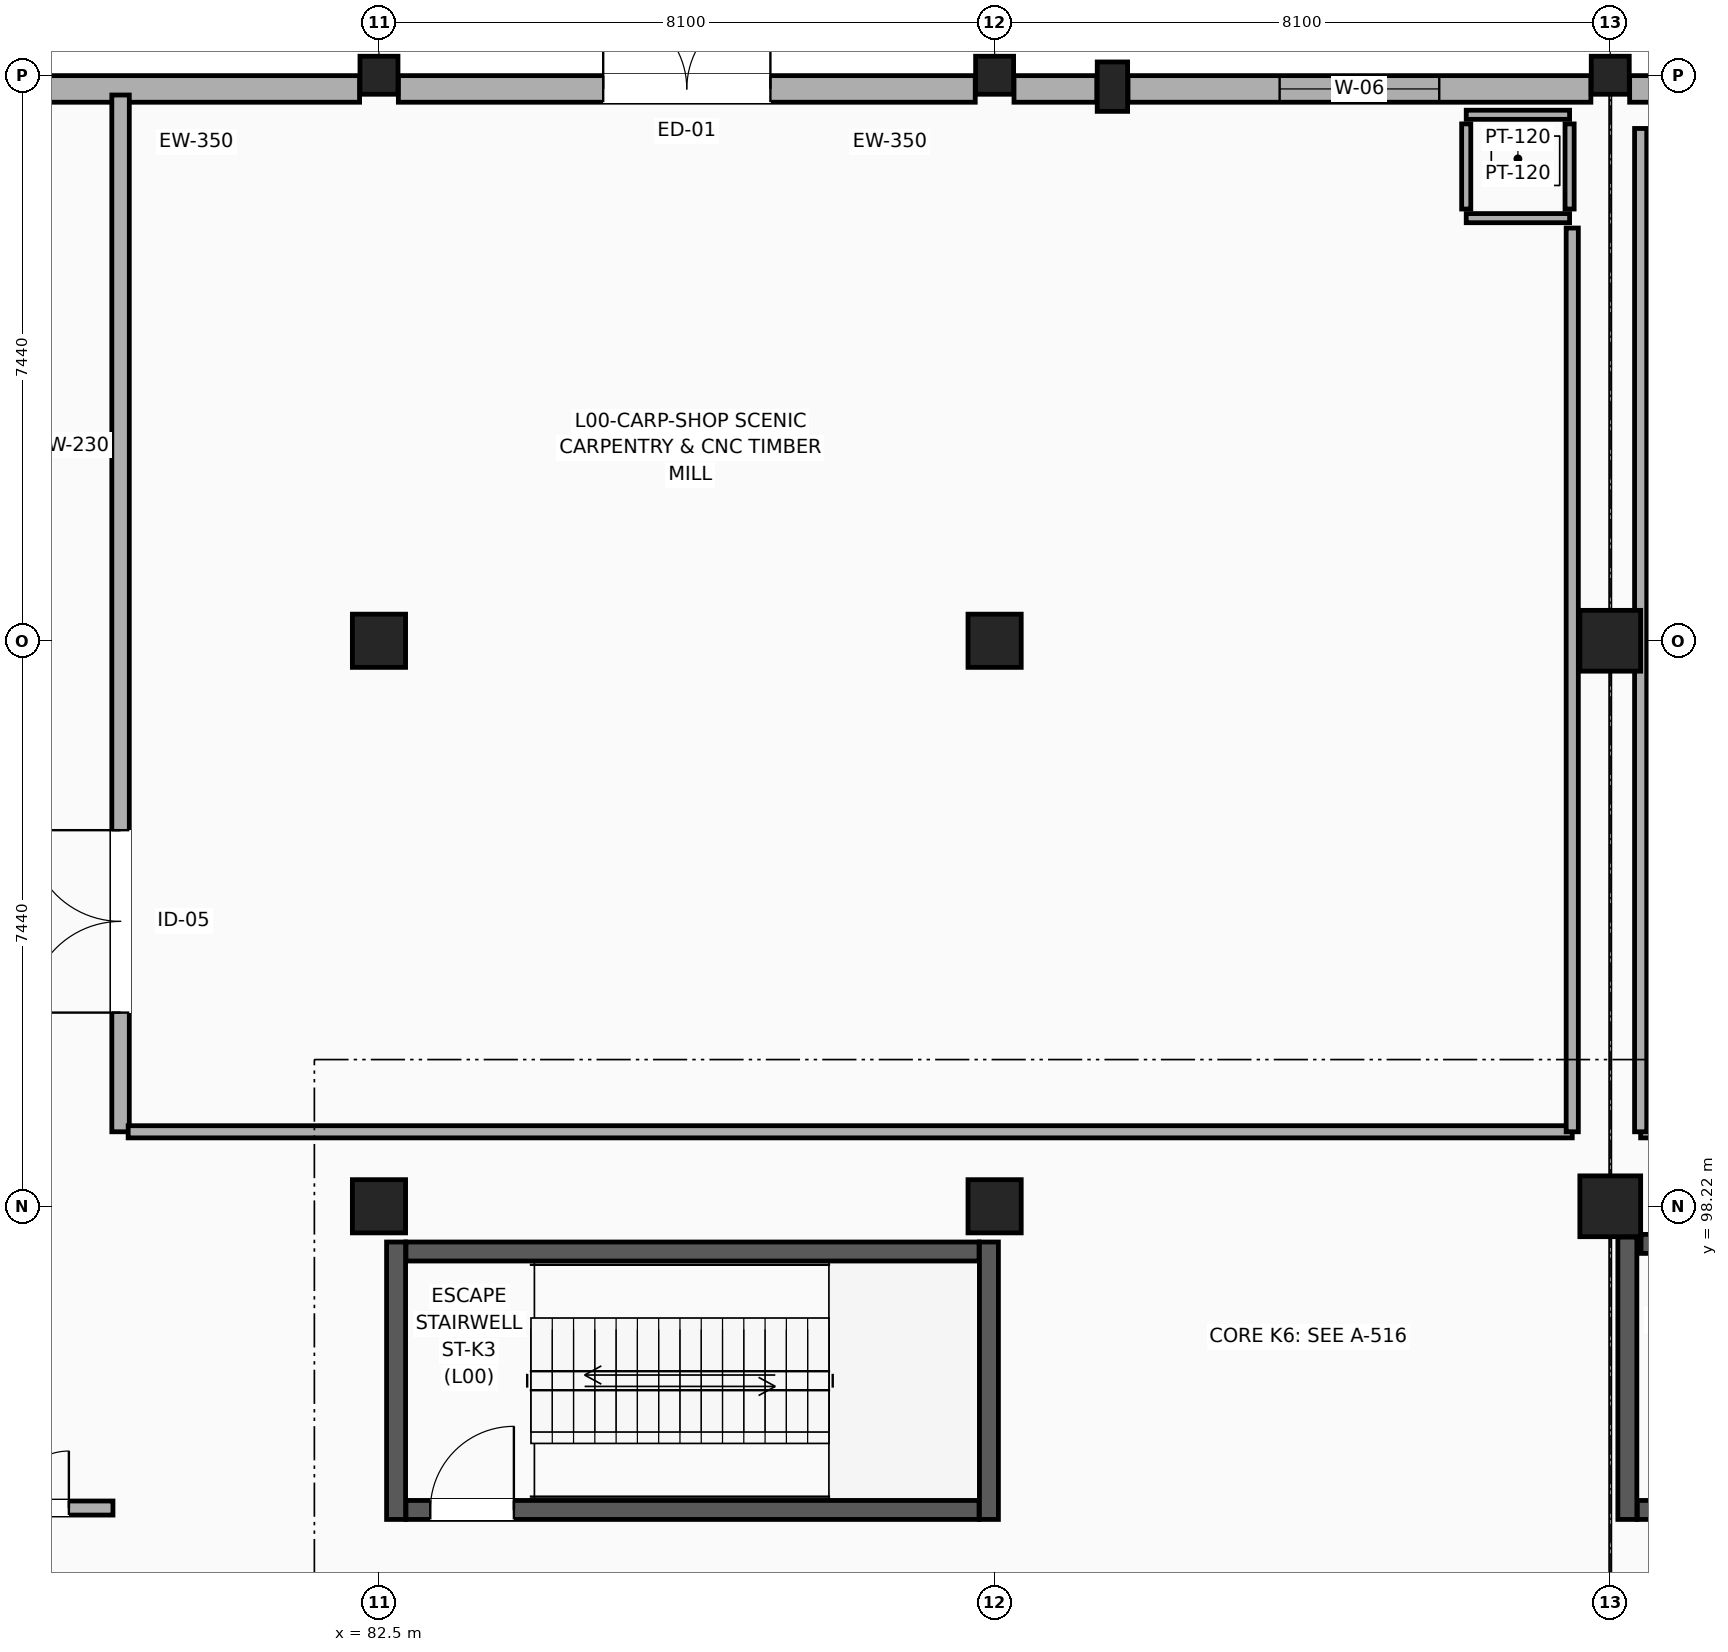
"""IFC4 building model, lengths in metres.
Left out: names, types, materials, properties, quantities, classifications, styles, units other than length and angle.
Written with IfcOpenShell. Run it as: python <this file> out.ifc"""

import sys

from ifc_helpers import new_model, si_unit, direction, frame, frame_2d, origin, origin_2d, place, context, subcontext, project, spatial, rectangle, extrude, element, fill, save


model = new_model("IFC4")
c1 = context("Model", 3, precision=1e-05, world=origin(), true_north=direction((0.0, 1.0)))
c2 = subcontext(c1, "Body", "Model", "MODEL_VIEW")
j1 = project(units=[si_unit("LENGTHUNIT", "METRE"), si_unit("PLANEANGLEUNIT", "RADIAN")], contexts=[c1])
p1 = place(None, origin())
s1 = spatial("IfcSite", under=j1, at=p1, CompositionType="ELEMENT")
p2 = place(p1, origin())
s2 = spatial("IfcBuilding", under=s1, at=p2, CompositionType="ELEMENT")
p3 = place(p2, origin())
s3 = spatial("IfcBuildingStorey", under=s2, at=p3, CompositionType="ELEMENT", Elevation=0.0)
p4 = place(p3, frame((92.15, 112.95, 0.0), z_axis=(0.0, 0.0, 1.0), x_axis=(1.0, 0.0, 0.0)))
e1 = element("IfcColumn", 1, at=p4, inside=s3, PredefinedType="PILASTER", context=c2, shape_type="SweptSolid", body=[
    extrude(rectangle(XDim=0.4, YDim=0.65, at=origin_2d()), origin(), (0.0, 0.0, 1.0), 5.4),
])
for number, where, z_axis, x_axis in (
    (2, (82.5, 98.22, 0.0), (0.0, 0.0, 1.0), (1.0, 0.0, 0.0)),
    (3, (82.5, 105.66, 0.0), (0.0, 0.0, 1.0), (1.0, 0.0, 0.0)),
):
    element("IfcColumn", number, at=place(p3, frame(where, z_axis=z_axis, x_axis=x_axis)), inside=s3, PredefinedType="COLUMN", context=c2, shape_type="SweptSolid", body=[
        extrude(rectangle(XDim=0.7, YDim=0.7, at=origin_2d()), origin(), (0.0, 0.0, 1.0), 5.4),
    ])
p5 = place(p3, frame((82.5, 113.1, 0.0), z_axis=(0.0, 0.0, 1.0), x_axis=(1.0, 0.0, 0.0)))
e4 = element("IfcColumn", 4, at=p5, inside=s3, PredefinedType="COLUMN", context=c2, shape_type="SweptSolid", body=[
    extrude(rectangle(XDim=0.5, YDim=0.5, at=origin_2d()), origin(), (0.0, 0.0, 1.0), 5.4),
])
for number, where, z_axis, x_axis in (
    (5, (90.6, 98.22, 0.0), (0.0, 0.0, 1.0), (1.0, 0.0, 0.0)),
    (6, (90.6, 105.66, 0.0), (0.0, 0.0, 1.0), (1.0, 0.0, 0.0)),
):
    element("IfcColumn", number, at=place(p3, frame(where, z_axis=z_axis, x_axis=x_axis)), inside=s3, PredefinedType="COLUMN", context=c2, shape_type="SweptSolid", body=[
        extrude(rectangle(XDim=0.7, YDim=0.7, at=origin_2d()), origin(), (0.0, 0.0, 1.0), 5.4),
    ])
p6 = place(p3, frame((90.6, 113.1, 0.0), z_axis=(0.0, 0.0, 1.0), x_axis=(1.0, 0.0, 0.0)))
e7 = element("IfcColumn", 7, at=p6, inside=s3, PredefinedType="COLUMN", context=c2, shape_type="SweptSolid", body=[
    extrude(rectangle(XDim=0.5, YDim=0.5, at=origin_2d()), origin(), (0.0, 0.0, 1.0), 5.4),
])
for number, where, z_axis, x_axis in (
    (8, (98.7, 98.22, 0.0), (0.0, 0.0, 1.0), (1.0, 0.0, 0.0)),
    (9, (98.7, 105.66, 0.0), (0.0, 0.0, 1.0), (1.0, 0.0, 0.0)),
):
    element("IfcColumn", number, at=place(p3, frame(where, z_axis=z_axis, x_axis=x_axis)), inside=s3, PredefinedType="COLUMN", context=c2, shape_type="SweptSolid", body=[
        extrude(rectangle(XDim=0.8, YDim=0.8, at=origin_2d()), origin(), (0.0, 0.0, 1.0), 5.4),
    ])
p7 = place(p3, frame((98.7, 113.1, 0.0), z_axis=(0.0, 0.0, 1.0), x_axis=(1.0, 0.0, 0.0)))
e10 = element("IfcColumn", 10, at=p7, inside=s3, PredefinedType="COLUMN", context=c2, shape_type="SweptSolid", body=[
    extrude(rectangle(XDim=0.5, YDim=0.5, at=origin_2d()), origin(), (0.0, 0.0, 1.0), 5.4),
])
p8 = place(p3, frame((74.655, 112.92, 0.0), z_axis=(0.0, 0.0, 1.0), x_axis=(1.0, 0.0, 0.0)))
e11 = element("IfcWall", 11, at=p8, inside=s3, PredefinedType="SOLIDWALL", context=c2, shape_type="SweptSolid", body=[
    extrude(rectangle(XDim=7.59, YDim=0.35, at=frame_2d((3.795, 0.0))), origin(), (0.0, 0.0, 1.0), 4.037),
])
p9 = place(p8, frame((1.645, 0.0, 0.0)))
e12 = element("IfcOpeningElement", 12, at=p9, cuts=e11, PredefinedType="OPENING", context=c2, shape_type="SweptSolid", body=[
    extrude(rectangle(XDim=1.2, YDim=2.2, at=frame_2d((0.6, 1.1))), frame((0.0, 0.185, 0.0), z_axis=(0.0, -1.0, 0.0), x_axis=(1.0, 0.0, 0.0)), (0.0, 0.0, 1.0), 0.37),
])
p10 = place(p3, frame((82.755, 112.92, 0.0), z_axis=(0.0, 0.0, 1.0), x_axis=(1.0, 0.0, 0.0)))
e13 = element("IfcWall", 13, at=p10, inside=s3, PredefinedType="SOLIDWALL", context=c2, shape_type="SweptSolid", body=[
    extrude(rectangle(XDim=7.59, YDim=0.35, at=frame_2d((3.795, 0.0))), origin(), (0.0, 0.0, 1.0), 4.037),
])
p11 = place(p10, frame((2.695, 0.0, 0.0)))
e14 = element("IfcOpeningElement", 14, at=p11, cuts=e13, PredefinedType="OPENING", context=c2, shape_type="SweptSolid", body=[
    extrude(rectangle(XDim=2.2, YDim=2.6, at=frame_2d((1.1, 1.3))), frame((0.0, 0.185, 0.0), z_axis=(0.0, -1.0, 0.0), x_axis=(1.0, 0.0, 0.0)), (0.0, 0.0, 1.0), 0.37),
])
p12 = place(p3, frame((92.355, 112.92, 0.0), z_axis=(0.0, 0.0, 1.0), x_axis=(1.0, 0.0, 0.0)))
e15 = element("IfcWall", 15, at=p12, inside=s3, PredefinedType="SOLIDWALL", context=c2, shape_type="SweptSolid", body=[
    extrude(rectangle(XDim=6.09, YDim=0.35, at=frame_2d((3.045, 0.0))), origin(), (0.0, 0.0, 1.0), 4.137),
])
p13 = place(p12, frame((1.995, 0.0, 0.9)))
e16 = element("IfcOpeningElement", 16, at=p13, cuts=e15, PredefinedType="OPENING", context=c2, shape_type="SweptSolid", body=[
    extrude(rectangle(XDim=2.1, YDim=1.5, at=frame_2d((1.05, 0.75))), frame((0.0, 0.185, 0.0), z_axis=(0.0, -1.0, 0.0), x_axis=(1.0, 0.0, 0.0)), (0.0, 0.0, 1.0), 0.37),
])
p14 = place(p3, frame((90.855, 112.92, 0.0), z_axis=(0.0, 0.0, 1.0), x_axis=(1.0, 0.0, 0.0)))
e17 = element("IfcWall", 17, at=p14, inside=s3, PredefinedType="SOLIDWALL", context=c2, shape_type="SweptSolid", body=[
    extrude(rectangle(XDim=1.09, YDim=0.35, at=frame_2d((0.545, 0.0))), origin(), (0.0, 0.0, 1.0), 4.137),
])
p15 = place(p3, frame((98.955, 112.92, 0.0), z_axis=(0.0, 0.0, 1.0), x_axis=(1.0, 0.0, 0.0)))
e18 = element("IfcWall", 18, at=p15, inside=s3, PredefinedType="SOLIDWALL", context=c2, shape_type="SweptSolid", body=[
    extrude(rectangle(XDim=1.065, YDim=0.35, at=frame_2d((0.532, 0.0))), origin(), (0.0, 0.0, 1.0), 4.137),
])
p16 = place(p3, frame((82.855, 94.225, 0.0), z_axis=(0.0, 0.0, 1.0), x_axis=(1.0, 0.0, 0.0)))
e19 = element("IfcWall", 19, at=p16, inside=s3, PredefinedType="SHEAR", context=c2, shape_type="SweptSolid", body=[
    extrude(rectangle(XDim=7.54, YDim=0.25, at=frame_2d((3.77, 0.0))), origin(), (0.0, 0.0, 1.0), 5.105),
])
p17 = place(p16, frame((0.32, 0.0, 0.0)))
e20 = element("IfcOpeningElement", 20, at=p17, cuts=e19, PredefinedType="OPENING", context=c2, shape_type="SweptSolid", body=[
    extrude(rectangle(XDim=1.1, YDim=2.2, at=frame_2d((0.55, 1.1))), frame((0.0, 0.135, 0.0), z_axis=(0.0, -1.0, 0.0), x_axis=(1.0, 0.0, 0.0)), (0.0, 0.0, 1.0), 0.27),
])
p18 = place(p3, frame((82.855, 97.625, 0.0), z_axis=(0.0, 0.0, 1.0), x_axis=(1.0, 0.0, 0.0)))
e21 = element("IfcWall", 21, at=p18, inside=s3, PredefinedType="SHEAR", context=c2, shape_type="SweptSolid", body=[
    extrude(rectangle(XDim=7.54, YDim=0.25, at=frame_2d((3.77, 0.0))), origin(), (0.0, 0.0, 1.0), 5.105),
])
for number, where, z_axis, x_axis in (
    (22, (82.725, 94.1, 0.0), (0.0, 0.0, 1.0), (0.0, 1.0, 0.0)),
    (23, (90.525, 94.1, 0.0), (0.0, 0.0, 1.0), (0.0, 1.0, 0.0)),
):
    element("IfcWall", number, at=place(p3, frame(where, z_axis=z_axis, x_axis=x_axis)), inside=s3, PredefinedType="SHEAR", context=c2, shape_type="SweptSolid", body=[
        extrude(rectangle(XDim=3.65, YDim=0.25, at=frame_2d((1.825, 0.0))), origin(), (0.0, 0.0, 1.0), 5.105),
    ])
p19 = place(p3, frame((99.055, 94.225, 0.0), z_axis=(0.0, 0.0, 1.0), x_axis=(1.0, 0.0, 0.0)))
e24 = element("IfcWall", 24, at=p19, inside=s3, PredefinedType="SHEAR", context=c2, shape_type="SweptSolid", body=[
    extrude(rectangle(XDim=7.54, YDim=0.25, at=frame_2d((3.77, 0.0))), origin(), (0.0, 0.0, 1.0), 5.105),
])
p20 = place(p19, frame((0.32, 0.0, 0.0)))
e25 = element("IfcOpeningElement", 25, at=p20, cuts=e24, PredefinedType="OPENING", context=c2, shape_type="SweptSolid", body=[
    extrude(rectangle(XDim=1.1, YDim=2.2, at=frame_2d((0.55, 1.1))), frame((0.0, 0.135, 0.0), z_axis=(0.0, -1.0, 0.0), x_axis=(1.0, 0.0, 0.0)), (0.0, 0.0, 1.0), 0.27),
])
p21 = place(p3, frame((99.105, 97.725, 0.0), z_axis=(0.0, 0.0, 1.0), x_axis=(1.0, 0.0, 0.0)))
e26 = element("IfcWall", 26, at=p21, inside=s3, PredefinedType="SHEAR", context=c2, shape_type="SweptSolid", body=[
    extrude(rectangle(XDim=7.49, YDim=0.25, at=frame_2d((3.745, 0.0))), origin(), (0.0, 0.0, 1.0), 5.105),
])
p22 = place(p3, frame((98.925, 94.1, 0.0), z_axis=(0.0, 0.0, 1.0), x_axis=(0.0, 1.0, 0.0)))
e27 = element("IfcWall", 27, at=p22, inside=s3, PredefinedType="SHEAR", context=c2, shape_type="SweptSolid", body=[
    extrude(rectangle(XDim=3.715, YDim=0.25, at=frame_2d((1.857, 0.0))), origin(), (0.0, 0.0, 1.0), 5.105),
])
for number, where, z_axis, x_axis in (
    (28, (96.805, 111.22, 0.0), (0.0, 0.0, 1.0), (1.0, 0.0, 0.0)),
    (29, (96.805, 112.58, 0.0), (0.0, 0.0, 1.0), (1.0, 0.0, 0.0)),
):
    element("IfcWall", number, at=place(p3, frame(where, z_axis=z_axis, x_axis=x_axis)), inside=s3, PredefinedType="PARTITIONING", context=c2, shape_type="SweptSolid", body=[
        extrude(rectangle(XDim=1.36, YDim=0.12, at=frame_2d((0.68, 0.0))), origin(), (0.0, 0.0, 1.0), 5.085),
    ])
for number, where, z_axis, x_axis in (
    (30, (96.805, 111.34, 0.0), (0.0, 0.0, 1.0), (0.0, 1.0, 0.0)),
    (31, (98.165, 111.34, 0.0), (0.0, 0.0, 1.0), (0.0, 1.0, 0.0)),
):
    element("IfcWall", number, at=place(p3, frame(where, z_axis=z_axis, x_axis=x_axis)), inside=s3, PredefinedType="PARTITIONING", context=c2, shape_type="SweptSolid", body=[
        extrude(rectangle(XDim=1.12, YDim=0.12, at=frame_2d((0.56, 0.0))), origin(), (0.0, 0.0, 1.0), 5.085),
    ])
p23 = place(p3, frame((74.8, 94.25, 0.0), z_axis=(0.0, 0.0, 1.0), x_axis=(1.0, 0.0, 0.0)))
e32 = element("IfcWall", 32, at=p23, inside=s3, PredefinedType="PARTITIONING", context=c2, shape_type="SweptSolid", body=[
    extrude(rectangle(XDim=4.2, YDim=0.185, at=frame_2d((2.1, 0.0))), origin(), (0.0, 0.0, 1.0), 4.817),
])
p24 = place(p23, frame((2.12, 0.0, 0.0)))
e33 = element("IfcOpeningElement", 33, at=p24, cuts=e32, PredefinedType="OPENING", context=c2, shape_type="SweptSolid", body=[
    extrude(rectangle(XDim=1.5, YDim=2.2, at=frame_2d((0.75, 1.1))), frame((0.0, 0.103, 0.0), z_axis=(0.0, -1.0, 0.0), x_axis=(1.0, 0.0, 0.0)), (0.0, 0.0, 1.0), 0.205),
])
p25 = place(p3, frame((79.1, 99.2, 0.0), z_axis=(0.0, 0.0, 1.0), x_axis=(0.0, 1.0, 0.0)))
e34 = element("IfcWall", 34, at=p25, inside=s3, PredefinedType="SOLIDWALL", context=c2, shape_type="SweptSolid", body=[
    extrude(rectangle(XDim=13.64, YDim=0.23, at=frame_2d((6.82, 0.0))), origin(), (0.0, 0.0, 1.0), 4.137),
])
p26 = place(p25, frame((1.568, 0.0, 0.0)))
e35 = element("IfcOpeningElement", 35, at=p26, cuts=e34, PredefinedType="OPENING", context=c2, shape_type="SweptSolid", body=[
    extrude(rectangle(XDim=2.4, YDim=2.8, at=frame_2d((1.2, 1.4))), frame((0.0, 0.125, 0.0), z_axis=(0.0, -1.0, 0.0), x_axis=(1.0, 0.0, 0.0)), (0.0, 0.0, 1.0), 0.25),
])
p27 = place(p3, frame((79.2, 99.2, 0.0), z_axis=(0.0, 0.0, 1.0), x_axis=(1.0, 0.0, 0.0)))
e36 = element("IfcWall", 36, at=p27, inside=s3, PredefinedType="PARTITIONING", context=c2, shape_type="SweptSolid", body=[
    extrude(rectangle(XDim=19.0, YDim=0.16, at=frame_2d((9.5, 0.0))), origin(), (0.0, 0.0, 1.0), 4.037),
])
p28 = place(p3, frame((98.2, 99.2, 0.0), z_axis=(0.0, 0.0, 1.0), x_axis=(0.0, 1.0, 0.0)))
e37 = element("IfcWall", 37, at=p28, inside=s3, PredefinedType="PARTITIONING", context=c2, shape_type="SweptSolid", body=[
    extrude(rectangle(XDim=11.89, YDim=0.16, at=frame_2d((5.945, 0.0))), origin(), (0.0, 0.0, 1.0), 4.137),
])
p29 = place(p3, frame((99.1, 99.2, 0.0), z_axis=(0.0, 0.0, 1.0), x_axis=(1.0, 0.0, 0.0)))
e38 = element("IfcWall", 38, at=p29, inside=s3, PredefinedType="PARTITIONING", context=c2, shape_type="SweptSolid", body=[
    extrude(rectangle(XDim=15.9, YDim=0.16, at=frame_2d((7.95, 0.0))), origin(), (0.0, 0.0, 1.0), 4.337),
])
p30 = place(p3, frame((99.1, 99.2, 0.0), z_axis=(0.0, 0.0, 1.0), x_axis=(0.0, 1.0, 0.0)))
e39 = element("IfcWall", 39, at=p30, inside=s3, PredefinedType="PARTITIONING", context=c2, shape_type="SweptSolid", body=[
    extrude(rectangle(XDim=13.2, YDim=0.16, at=frame_2d((6.6, 0.0))), origin(), (0.0, 0.0, 1.0), 4.137),
])
p31 = place(p11, origin())
e40 = element("IfcDoor", 40, at=p31, inside=s3, OperationType="DOUBLE_DOOR_SINGLE_SWING", PredefinedType="DOOR", context=c2, shape_type="SweptSolid", body=[
    extrude(rectangle(XDim=2.2, YDim=2.6, at=frame_2d((1.1, 1.3))), frame((0.0, 0.025, 0.0), z_axis=(0.0, -1.0, 0.0), x_axis=(1.0, 0.0, 0.0)), (0.0, 0.0, 1.0), 0.05),
])
fill(e14, e40)
p32 = place(p13, origin())
e41 = element("IfcWindow", 41, at=p32, inside=s3, PartitioningType="SINGLE_PANEL", PredefinedType="WINDOW", context=c2, shape_type="SweptSolid", body=[
    extrude(rectangle(XDim=2.1, YDim=1.5, at=frame_2d((1.05, 0.75))), frame((0.0, 0.03, 0.0), z_axis=(0.0, -1.0, 0.0), x_axis=(1.0, 0.0, 0.0)), (0.0, 0.0, 1.0), 0.06),
])
fill(e16, e41)
p33 = place(p17, origin())
e42 = element("IfcDoor", 42, at=p33, inside=s3, OperationType="SINGLE_SWING_RIGHT", PredefinedType="DOOR", context=c2, shape_type="SweptSolid", body=[
    extrude(rectangle(XDim=1.1, YDim=2.2, at=frame_2d((0.55, 1.1))), frame((0.0, 0.025, 0.0), z_axis=(0.0, -1.0, 0.0), x_axis=(1.0, 0.0, 0.0)), (0.0, 0.0, 1.0), 0.05),
])
fill(e20, e42)
p34 = place(p24, origin())
e43 = element("IfcDoor", 43, at=p34, inside=s3, OperationType="DOUBLE_DOOR_SINGLE_SWING", PredefinedType="DOOR", context=c2, shape_type="SweptSolid", body=[
    extrude(rectangle(XDim=1.5, YDim=2.2, at=frame_2d((0.75, 1.1))), frame((0.0, 0.025, 0.0), z_axis=(0.0, -1.0, 0.0), x_axis=(1.0, 0.0, 0.0)), (0.0, 0.0, 1.0), 0.05),
])
fill(e33, e43)
p35 = place(p26, origin())
e44 = element("IfcDoor", 44, at=p35, inside=s3, OperationType="DOUBLE_DOOR_SINGLE_SWING", PredefinedType="DOOR", context=c2, shape_type="SweptSolid", body=[
    extrude(rectangle(XDim=2.4, YDim=2.8, at=frame_2d((1.2, 1.4))), frame((0.0, 0.025, 0.0), z_axis=(0.0, -1.0, 0.0), x_axis=(1.0, 0.0, 0.0)), (0.0, 0.0, 1.0), 0.05),
])
fill(e35, e44)
save(model, sys.argv[1])
